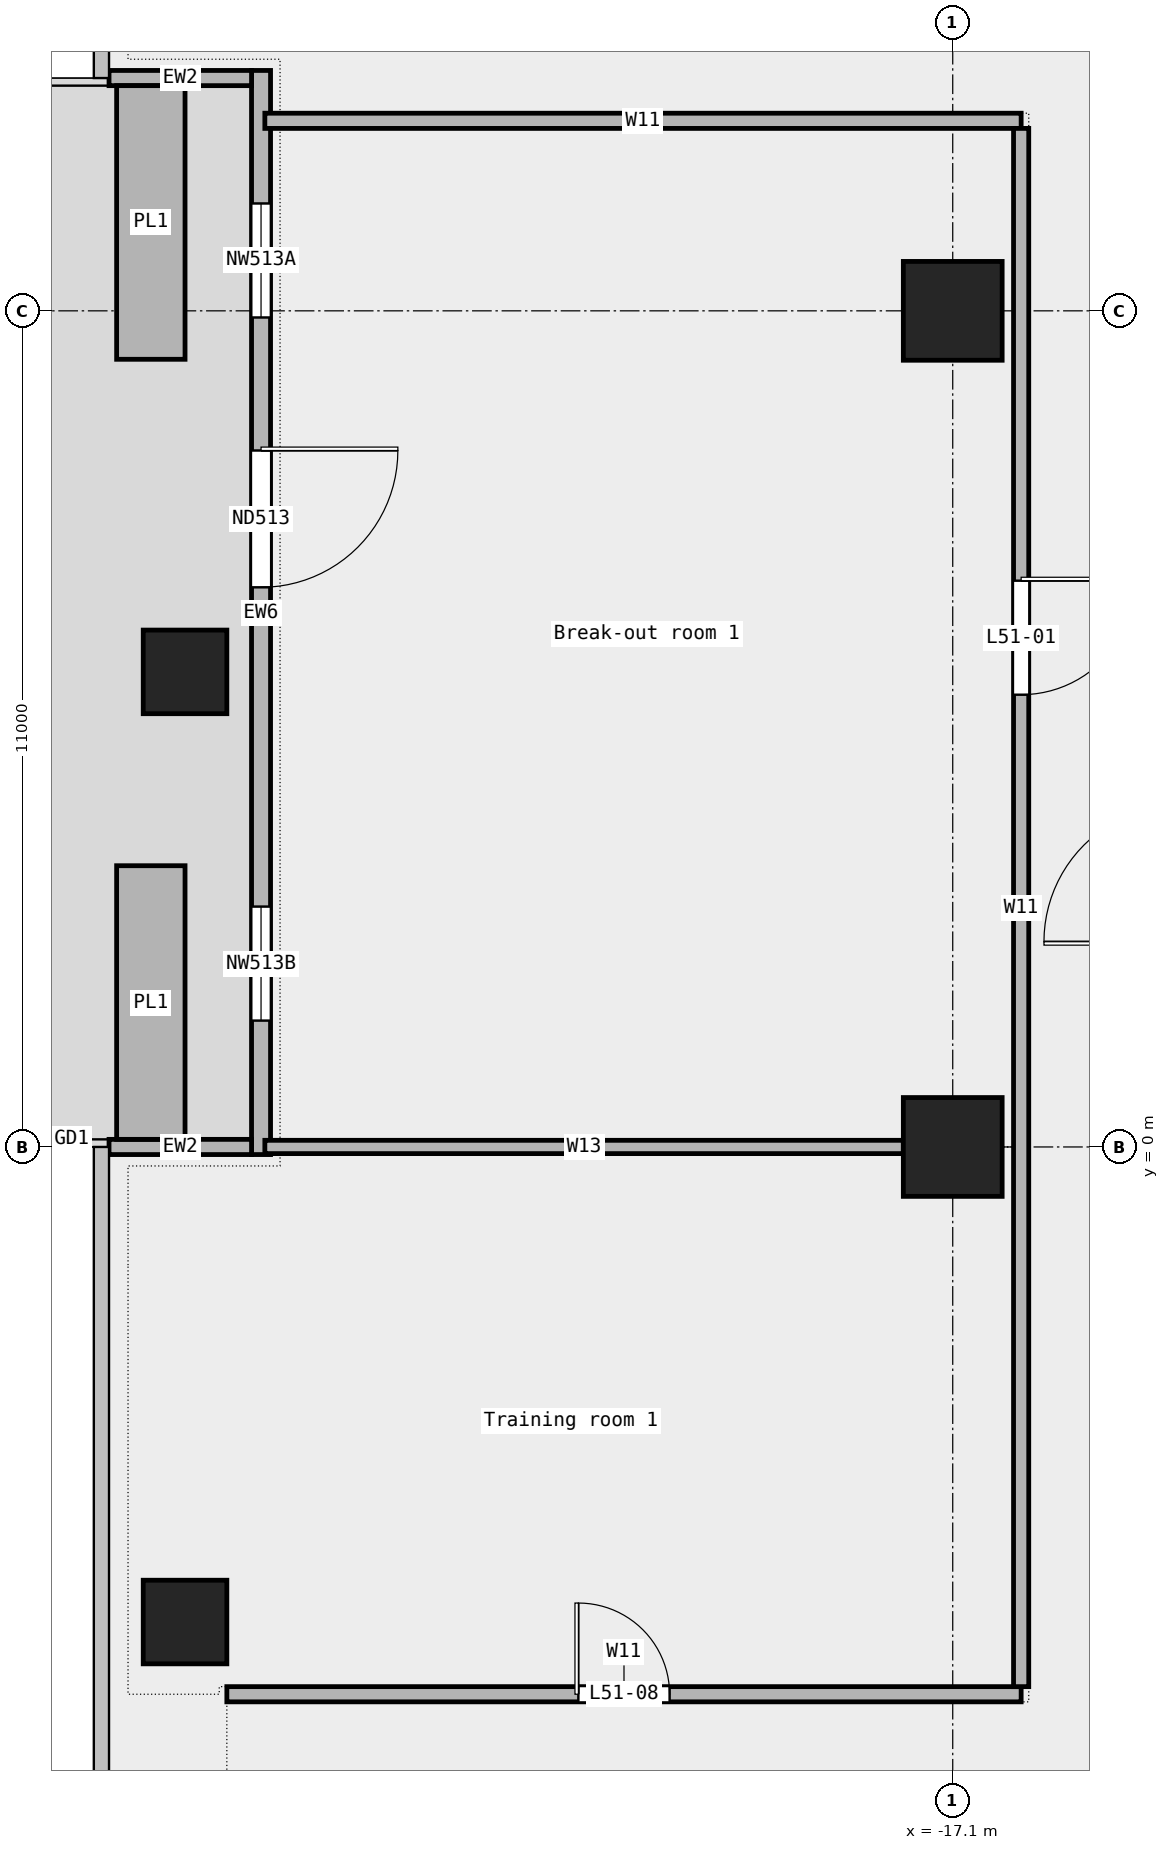
"""IFC4 building model, lengths in metres.
Left out: names, types, materials, properties, quantities, classifications, styles, units other than length and angle.
Written with IfcOpenShell. Run it as: python <this file> out.ifc"""

import sys

from ifc_helpers import new_model, si_unit, direction, frame, frame_2d, origin, origin_2d, place, context, subcontext, project, spatial, rectangle, extrude, element, fill, save


model = new_model("IFC4")
c1 = context("Model", 3, precision=1e-05, world=origin(), true_north=direction((0.0, 1.0)))
c2 = subcontext(c1, "Body", "Model", "MODEL_VIEW")
j1 = project(units=[si_unit("LENGTHUNIT", "METRE"), si_unit("PLANEANGLEUNIT", "RADIAN")], contexts=[c1])
p1 = place(None, origin())
s1 = spatial("IfcSite", under=j1, at=p1, CompositionType="ELEMENT")
p2 = place(p1, origin())
s2 = spatial("IfcBuilding", under=s1, at=p2, CompositionType="ELEMENT")
p3 = place(p2, frame((0.0, 0.0, 239.0)))
s3 = spatial("IfcBuildingStorey", under=s2, at=p3, CompositionType="ELEMENT", Elevation=239.0)
for number, where, z_axis, x_axis in (
    (1, (-27.2, 6.25, 0.0), (0.0, 0.0, 1.0), (1.0, 0.0, 0.0)),
    (2, (-27.2, -6.25, 0.0), (0.0, 0.0, 1.0), (1.0, 0.0, 0.0)),
):
    element("IfcColumn", number, at=place(p3, frame(where, z_axis=z_axis, x_axis=x_axis)), inside=s3, PredefinedType="COLUMN", context=c2, shape_type="SweptSolid", body=[
        extrude(rectangle(XDim=1.1, YDim=1.1, at=origin_2d()), origin(), (0.0, 0.0, 1.0), 3.6),
    ])
for number, where, z_axis, x_axis in (
    (3, (-17.1, 0.0, 0.0), (0.0, 0.0, 1.0), (1.0, 0.0, 0.0)),
    (4, (-17.1, 11.0, 0.0), (0.0, 0.0, 1.0), (1.0, 0.0, 0.0)),
):
    element("IfcColumn", number, at=place(p3, frame(where, z_axis=z_axis, x_axis=x_axis)), inside=s3, PredefinedType="COLUMN", context=c2, shape_type="SweptSolid", body=[
        extrude(rectangle(XDim=1.3, YDim=1.3, at=origin_2d()), origin(), (0.0, 0.0, 1.0), 3.6),
    ])
p4 = place(p3, frame((-26.2, 14.163, 0.0), z_axis=(0.0, 0.0, 1.0), x_axis=(0.0, -1.0, 0.0)))
e5 = element("IfcWall", 5, at=p4, inside=s3, PredefinedType="STANDARD", context=c2, shape_type="SweptSolid", body=[
    extrude(rectangle(XDim=14.263, YDim=0.25, at=frame_2d((7.131, 0.0))), origin(), (0.0, 0.0, 1.0), 3.6),
])
p5 = place(p4, frame((1.75, 0.0, 0.45)))
e6 = element("IfcOpeningElement", 6, at=p5, cuts=e5, PredefinedType="OPENING", context=c2, shape_type="SweptSolid", body=[
    extrude(rectangle(XDim=1.5, YDim=2.4, at=frame_2d((0.75, 1.2))), frame((0.0, 0.137, 0.0), z_axis=(0.0, -1.0, 0.0), x_axis=(1.0, 0.0, 0.0)), (0.0, 0.0, 1.0), 0.274),
])
p6 = place(p4, frame((5.0, 0.0, 0.0)))
e7 = element("IfcOpeningElement", 7, at=p6, cuts=e5, PredefinedType="OPENING", context=c2, shape_type="SweptSolid", body=[
    extrude(rectangle(XDim=1.8, YDim=2.4, at=frame_2d((0.9, 1.2))), frame((0.0, 0.137, 0.0), z_axis=(0.0, -1.0, 0.0), x_axis=(1.0, 0.0, 0.0)), (0.0, 0.0, 1.0), 0.274),
])
p7 = place(p4, frame((11.0, 0.0, 0.45)))
e8 = element("IfcOpeningElement", 8, at=p7, cuts=e5, PredefinedType="OPENING", context=c2, shape_type="SweptSolid", body=[
    extrude(rectangle(XDim=1.5, YDim=2.4, at=frame_2d((0.75, 1.2))), frame((0.0, 0.137, 0.0), z_axis=(0.0, -1.0, 0.0), x_axis=(1.0, 0.0, 0.0)), (0.0, 0.0, 1.0), 0.274),
])
for number, where, z_axis, x_axis in (
    (9, (-28.2, 14.062, 0.0), (0.0, 0.0, 1.0), (1.0, 0.0, 0.0)),
    (10, (-28.2, 0.0, 0.0), (0.0, 0.0, 1.0), (1.0, 0.0, 0.0)),
):
    element("IfcWall", number, at=place(p3, frame(where, z_axis=z_axis, x_axis=x_axis)), inside=s3, PredefinedType="STANDARD", context=c2, shape_type="SweptSolid", body=[
        extrude(rectangle(XDim=1.875, YDim=0.2, at=frame_2d((0.938, 0.0))), origin(), (0.0, 0.0, 1.0), 3.6),
    ])
for number, where, z_axis, x_axis in (
    (11, (-27.65, 13.962, 0.0), (0.0, 0.0, 1.0), (0.0, -1.0, 0.0)),
    (12, (-27.65, 3.7, 0.0), (0.0, 0.0, 1.0), (0.0, -1.0, 0.0)),
):
    element("IfcWall", number, at=place(p3, frame(where, z_axis=z_axis, x_axis=x_axis)), inside=s3, PredefinedType="STANDARD", context=c2, shape_type="SweptSolid", body=[
        extrude(rectangle(XDim=3.6, YDim=0.9, at=frame_2d((1.8, 0.0))), origin(), (0.0, 0.0, 1.0), 0.7),
    ])
p8 = place(p3, frame((-26.65, -7.2, 0.0), z_axis=(0.0, 0.0, 1.0), x_axis=(1.0, 0.0, 0.0)))
e13 = element("IfcWall", 13, at=p8, inside=s3, PredefinedType="PARTITIONING", context=c2, shape_type="SweptSolid", body=[
    extrude(rectangle(XDim=10.45, YDim=0.2, at=frame_2d((5.225, 0.0))), origin(), (0.0, 0.0, 1.0), 3.6),
])
p9 = place(p8, frame((4.625, 0.0, 0.0)))
e14 = element("IfcOpeningElement", 14, at=p9, cuts=e13, PredefinedType="OPENING", context=c2, shape_type="SweptSolid", body=[
    extrude(rectangle(XDim=1.2, YDim=2.1, at=frame_2d((0.6, 1.05))), frame((0.0, 0.112, 0.0), z_axis=(0.0, -1.0, 0.0), x_axis=(1.0, 0.0, 0.0)), (0.0, 0.0, 1.0), 0.224),
])
p10 = place(p3, frame((-26.15, 0.0, 0.0), z_axis=(0.0, 0.0, 1.0), x_axis=(1.0, 0.0, 0.0)))
e15 = element("IfcWall", 15, at=p10, inside=s3, PredefinedType="PARTITIONING", context=c2, shape_type="SweptSolid", body=[
    extrude(rectangle(XDim=8.4, YDim=0.175, at=frame_2d((4.2, 0.0))), origin(), (0.0, 0.0, 1.0), 3.6),
])
p11 = place(p3, frame((-26.15, 13.5, 0.0), z_axis=(0.0, 0.0, 1.0), x_axis=(1.0, 0.0, 0.0)))
e16 = element("IfcWall", 16, at=p11, inside=s3, PredefinedType="PARTITIONING", context=c2, shape_type="SweptSolid", body=[
    extrude(rectangle(XDim=9.95, YDim=0.2, at=frame_2d((4.975, 0.0))), origin(), (0.0, 0.0, 1.0), 3.6),
])
p12 = place(p3, frame((-16.2, -7.1, 0.0), z_axis=(0.0, 0.0, 1.0), x_axis=(0.0, 1.0, 0.0)))
e17 = element("IfcWall", 17, at=p12, inside=s3, PredefinedType="PARTITIONING", context=c2, shape_type="SweptSolid", body=[
    extrude(rectangle(XDim=20.5, YDim=0.2, at=frame_2d((10.25, 0.0))), origin(), (0.0, 0.0, 1.0), 3.6),
])
p13 = place(p12, frame((13.05, 0.0, 0.0)))
e18 = element("IfcOpeningElement", 18, at=p13, cuts=e17, PredefinedType="OPENING", context=c2, shape_type="SweptSolid", body=[
    extrude(rectangle(XDim=1.5, YDim=2.1, at=frame_2d((0.75, 1.05))), frame((0.0, 0.112, 0.0), z_axis=(0.0, -1.0, 0.0), x_axis=(1.0, 0.0, 0.0)), (0.0, 0.0, 1.0), 0.224),
])
p14 = place(p5, origin())
e19 = element("IfcWindow", 19, at=p14, inside=s3, PartitioningType="SINGLE_PANEL", PredefinedType="WINDOW", context=c2, shape_type="SweptSolid", body=[
    extrude(rectangle(XDim=1.5, YDim=2.4, at=frame_2d((0.75, 1.2))), frame((0.0, 0.03, 0.0), z_axis=(0.0, -1.0, 0.0), x_axis=(1.0, 0.0, 0.0)), (0.0, 0.0, 1.0), 0.06),
])
fill(e6, e19)
p15 = place(p6, origin())
e20 = element("IfcDoor", 20, at=p15, inside=s3, OperationType="DOUBLE_DOOR_SINGLE_SWING", PredefinedType="DOOR", context=c2, shape_type="SweptSolid", body=[
    extrude(rectangle(XDim=1.8, YDim=2.4, at=frame_2d((0.9, 1.2))), frame((0.0, 0.025, 0.0), z_axis=(0.0, -1.0, 0.0), x_axis=(1.0, 0.0, 0.0)), (0.0, 0.0, 1.0), 0.05),
])
fill(e7, e20)
p16 = place(p7, origin())
e21 = element("IfcWindow", 21, at=p16, inside=s3, PartitioningType="SINGLE_PANEL", PredefinedType="WINDOW", context=c2, shape_type="SweptSolid", body=[
    extrude(rectangle(XDim=1.5, YDim=2.4, at=frame_2d((0.75, 1.2))), frame((0.0, 0.03, 0.0), z_axis=(0.0, -1.0, 0.0), x_axis=(1.0, 0.0, 0.0)), (0.0, 0.0, 1.0), 0.06),
])
fill(e8, e21)
p17 = place(p13, origin())
e22 = element("IfcDoor", 22, at=p17, inside=s3, OperationType="DOUBLE_DOOR_SINGLE_SWING", PredefinedType="DOOR", context=c2, shape_type="SweptSolid", body=[
    extrude(rectangle(XDim=1.5, YDim=2.1, at=frame_2d((0.75, 1.05))), frame((0.0, 0.025, 0.0), z_axis=(0.0, -1.0, 0.0), x_axis=(1.0, 0.0, 0.0)), (0.0, 0.0, 1.0), 0.05),
])
fill(e18, e22)
p18 = place(p9, origin())
e23 = element("IfcDoor", 23, at=p18, inside=s3, OperationType="SINGLE_SWING_LEFT", PredefinedType="DOOR", context=c2, shape_type="SweptSolid", body=[
    extrude(rectangle(XDim=1.2, YDim=2.1, at=frame_2d((0.6, 1.05))), frame((0.0, 0.025, 0.0), z_axis=(0.0, -1.0, 0.0), x_axis=(1.0, 0.0, 0.0)), (0.0, 0.0, 1.0), 0.05),
])
fill(e14, e23)
save(model, sys.argv[1])
